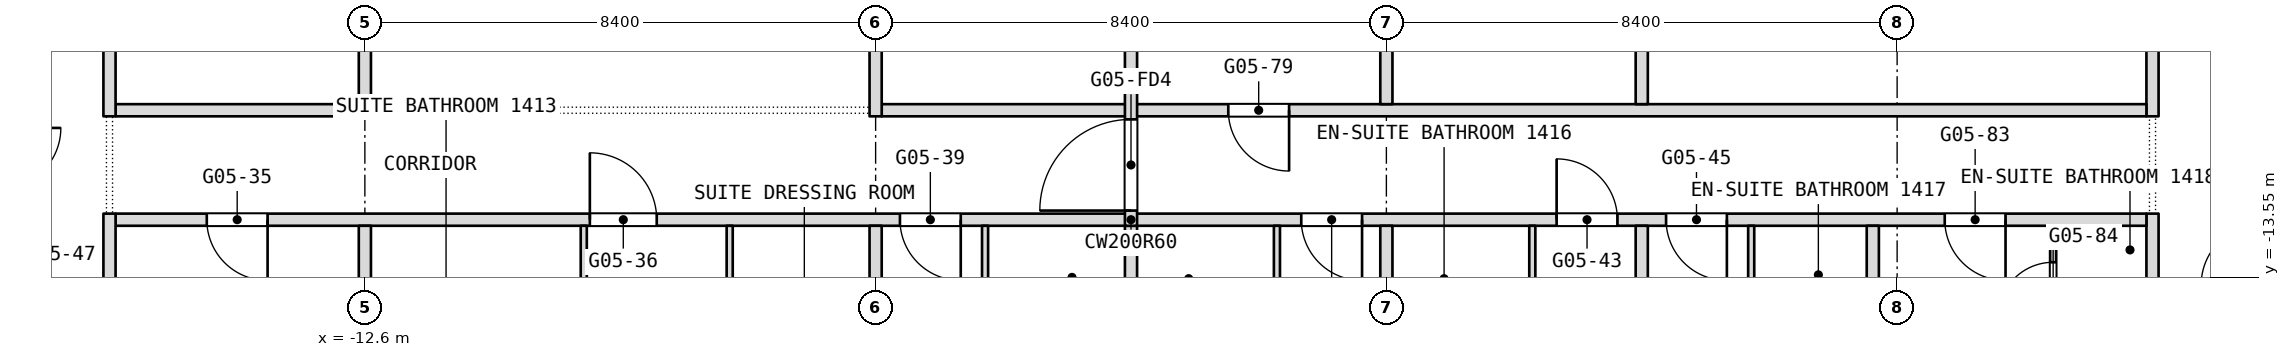
"""IFC4 building model, lengths in metres.
Left out: names, types, materials, properties, quantities, classifications, styles, units other than length and angle.
Written with IfcOpenShell. Run it as: python <this file> out.ifc"""

import sys

from ifc_helpers import new_model, si_unit, direction, frame, frame_2d, origin, place, context, subcontext, project, spatial, rectangle, extrude, element, fill, save


model = new_model("IFC4")
c1 = context("Model", 3, precision=1e-05, world=origin(), true_north=direction((0.0, 1.0)))
c2 = subcontext(c1, "Body", "Model", "MODEL_VIEW")
j1 = project(units=[si_unit("LENGTHUNIT", "METRE"), si_unit("PLANEANGLEUNIT", "RADIAN")], contexts=[c1])
p1 = place(None, origin())
s1 = spatial("IfcSite", under=j1, at=p1, CompositionType="ELEMENT")
p2 = place(p1, origin())
s2 = spatial("IfcBuilding", under=s1, at=p2, CompositionType="ELEMENT")
p3 = place(p2, frame((0.0, 0.0, 65.3)))
s3 = spatial("IfcBuildingStorey", under=s2, at=p3, CompositionType="ELEMENT", Elevation=65.3)
p4 = place(p3, frame((16.8, -17.143, 0.0), z_axis=(0.0, 0.0, 1.0), x_axis=(0.0, 1.0, 0.0)))
e1 = element("IfcWall", 1, at=p4, inside=s3, PredefinedType="PARTITIONING", context=c2, shape_type="SweptSolid", body=[
    extrude(rectangle(XDim=4.643, YDim=0.2, at=frame_2d((2.322, 0.0))), origin(), (0.0, 0.0, 1.0), 3.34),
])
p5 = place(p4, frame((0.772, 0.0, 0.0)))
e2 = element("IfcOpeningElement", 2, at=p5, cuts=e1, PredefinedType="OPENING", context=c2, shape_type="SweptSolid", body=[
    extrude(rectangle(XDim=0.9, YDim=2.1, at=frame_2d((0.45, 1.05))), frame((0.0, 0.1, 0.0), z_axis=(0.0, -1.0, 0.0), x_axis=(1.0, 0.0, 0.0)), (0.0, 0.0, 1.0), 0.2),
])
p6 = place(p3, frame((16.8, -10.9, 0.0), z_axis=(0.0, 0.0, 1.0), x_axis=(0.0, 1.0, 0.0)))
e3 = element("IfcWall", 3, at=p6, inside=s3, PredefinedType="PARTITIONING", context=c2, shape_type="SweptSolid", body=[
    extrude(rectangle(XDim=7.3, YDim=0.2, at=frame_2d((3.65, 0.0))), origin(), (0.0, 0.0, 1.0), 3.34),
])
p7 = place(p6, frame((3.15, 0.0, 0.0)))
e4 = element("IfcOpeningElement", 4, at=p7, cuts=e3, PredefinedType="OPENING", context=c2, shape_type="SweptSolid", body=[
    extrude(rectangle(XDim=1.0, YDim=2.1, at=frame_2d((0.5, 1.05))), frame((0.0, 0.1, 0.0), z_axis=(0.0, -1.0, 0.0), x_axis=(1.0, 0.0, 0.0)), (0.0, 0.0, 1.0), 0.2),
])
p8 = place(p3, frame((15.166, -15.0, 0.0), z_axis=(0.0, 0.0, 1.0), x_axis=(0.0, 1.0, 0.0)))
e5 = element("IfcWall", 5, at=p8, inside=s3, PredefinedType="PARTITIONING", context=c2, shape_type="SweptSolid", body=[
    extrude(rectangle(XDim=2.3, YDim=0.1, at=frame_2d((1.15, 0.0))), origin(), (0.0, 0.0, 1.0), 3.34),
])
p9 = place(p8, frame((0.8, 0.0, 0.0)))
e6 = element("IfcOpeningElement", 6, at=p9, cuts=e5, PredefinedType="OPENING", context=c2, shape_type="SweptSolid", body=[
    extrude(rectangle(XDim=0.9, YDim=2.1, at=frame_2d((0.45, 1.05))), frame((0.0, 0.05, 0.0), z_axis=(0.0, -1.0, 0.0), x_axis=(1.0, 0.0, 0.0)), (0.0, 0.0, 1.0), 0.1),
])
p10 = place(p3, frame((-16.7, -12.6, 0.0), z_axis=(0.0, 0.0, 1.0), x_axis=(1.0, 0.0, 0.0)))
e7 = element("IfcWall", 7, at=p10, inside=s3, PredefinedType="PARTITIONING", context=c2, shape_type="SweptSolid", body=[
    extrude(rectangle(XDim=33.4, YDim=0.2, at=frame_2d((16.7, 0.0))), origin(), (0.0, 0.0, 1.0), 3.34),
])
p11 = place(p10, frame((1.5, 0.0, 0.0)))
e8 = element("IfcOpeningElement", 8, at=p11, cuts=e7, PredefinedType="OPENING", context=c2, shape_type="SweptSolid", body=[
    extrude(rectangle(XDim=1.0, YDim=2.1, at=frame_2d((0.5, 1.05))), frame((0.0, 0.1, 0.0), z_axis=(0.0, -1.0, 0.0), x_axis=(1.0, 0.0, 0.0)), (0.0, 0.0, 1.0), 0.2),
])
p12 = place(p10, frame((7.8, 0.0, 0.0)))
e9 = element("IfcOpeningElement", 9, at=p12, cuts=e7, PredefinedType="OPENING", context=c2, shape_type="SweptSolid", body=[
    extrude(rectangle(XDim=1.1, YDim=2.1, at=frame_2d((0.55, 1.05))), frame((0.0, 0.1, 0.0), z_axis=(0.0, -1.0, 0.0), x_axis=(1.0, 0.0, 0.0)), (0.0, 0.0, 1.0), 0.2),
])
p13 = place(p10, frame((12.9, 0.0, 0.0)))
e10 = element("IfcOpeningElement", 10, at=p13, cuts=e7, PredefinedType="OPENING", context=c2, shape_type="SweptSolid", body=[
    extrude(rectangle(XDim=1.0, YDim=2.1, at=frame_2d((0.5, 1.05))), frame((0.0, 0.1, 0.0), z_axis=(0.0, -1.0, 0.0), x_axis=(1.0, 0.0, 0.0)), (0.0, 0.0, 1.0), 0.2),
])
p14 = place(p10, frame((19.5, 0.0, 0.0)))
e11 = element("IfcOpeningElement", 11, at=p14, cuts=e7, PredefinedType="OPENING", context=c2, shape_type="SweptSolid", body=[
    extrude(rectangle(XDim=1.0, YDim=2.1, at=frame_2d((0.5, 1.05))), frame((0.0, 0.1, 0.0), z_axis=(0.0, -1.0, 0.0), x_axis=(1.0, 0.0, 0.0)), (0.0, 0.0, 1.0), 0.2),
])
p15 = place(p10, frame((23.7, 0.0, 0.0)))
e12 = element("IfcOpeningElement", 12, at=p15, cuts=e7, PredefinedType="OPENING", context=c2, shape_type="SweptSolid", body=[
    extrude(rectangle(XDim=1.0, YDim=2.1, at=frame_2d((0.5, 1.05))), frame((0.0, 0.1, 0.0), z_axis=(0.0, -1.0, 0.0), x_axis=(1.0, 0.0, 0.0)), (0.0, 0.0, 1.0), 0.2),
])
p16 = place(p10, frame((25.5, 0.0, 0.0)))
e13 = element("IfcOpeningElement", 13, at=p16, cuts=e7, PredefinedType="OPENING", context=c2, shape_type="SweptSolid", body=[
    extrude(rectangle(XDim=1.0, YDim=2.1, at=frame_2d((0.5, 1.05))), frame((0.0, 0.1, 0.0), z_axis=(0.0, -1.0, 0.0), x_axis=(1.0, 0.0, 0.0)), (0.0, 0.0, 1.0), 0.2),
])
p17 = place(p10, frame((30.083, 0.0, 0.0)))
e14 = element("IfcOpeningElement", 14, at=p17, cuts=e7, PredefinedType="OPENING", context=c2, shape_type="SweptSolid", body=[
    extrude(rectangle(XDim=1.0, YDim=2.1, at=frame_2d((0.5, 1.05))), frame((0.0, 0.1, 0.0), z_axis=(0.0, -1.0, 0.0), x_axis=(1.0, 0.0, 0.0)), (0.0, 0.0, 1.0), 0.2),
])
p18 = place(p3, frame((12.2, -15.325, 0.0), z_axis=(0.0, 0.0, 1.0), x_axis=(0.0, 1.0, 0.0)))
e15 = element("IfcWall", 15, at=p18, inside=s3, PredefinedType="PARTITIONING", context=c2, shape_type="SweptSolid", body=[
    extrude(rectangle(XDim=2.625, YDim=0.2, at=frame_2d((1.312, 0.0))), origin(), (0.0, 0.0, 1.0), 3.34),
])
p19 = place(p3, frame((-16.7, -10.8, 0.0), z_axis=(0.0, 0.0, 1.0), x_axis=(1.0, 0.0, 0.0)))
e16 = element("IfcWall", 16, at=p19, inside=s3, PredefinedType="PARTITIONING", context=c2, shape_type="SweptSolid", body=[
    extrude(rectangle(XDim=4.0, YDim=0.2, at=frame_2d((2.0, 0.0))), origin(), (0.0, 0.0, 1.0), 3.34),
])
p20 = place(p3, frame((-4.1, -10.8, 0.0), z_axis=(0.0, 0.0, 1.0), x_axis=(1.0, 0.0, 0.0)))
e17 = element("IfcWall", 17, at=p20, inside=s3, PredefinedType="PARTITIONING", context=c2, shape_type="SweptSolid", body=[
    extrude(rectangle(XDim=20.8, YDim=0.2, at=frame_2d((10.4, 0.0))), origin(), (0.0, 0.0, 1.0), 3.34),
])
p21 = place(p20, frame((5.7, 0.0, 0.0)))
e18 = element("IfcOpeningElement", 18, at=p21, cuts=e17, PredefinedType="OPENING", context=c2, shape_type="SweptSolid", body=[
    extrude(rectangle(XDim=1.0, YDim=2.1, at=frame_2d((0.5, 1.05))), frame((0.0, 0.1, 0.0), z_axis=(0.0, -1.0, 0.0), x_axis=(1.0, 0.0, 0.0)), (0.0, 0.0, 1.0), 0.2),
])
p22 = place(p3, frame((10.2, -15.425, 0.0), z_axis=(0.0, 0.0, 1.0), x_axis=(0.0, 1.0, 0.0)))
e19 = element("IfcWall", 19, at=p22, inside=s3, PredefinedType="PARTITIONING", context=c2, shape_type="SweptSolid", body=[
    extrude(rectangle(XDim=2.725, YDim=0.1, at=frame_2d((1.363, 0.0))), origin(), (0.0, 0.0, 1.0), 3.34),
])
p23 = place(p3, frame((8.4, -17.7, 0.0), z_axis=(0.0, 0.0, 1.0), x_axis=(0.0, 1.0, 0.0)))
e20 = element("IfcWall", 20, at=p23, inside=s3, PredefinedType="PARTITIONING", context=c2, shape_type="SweptSolid", body=[
    extrude(rectangle(XDim=5.0, YDim=0.2, at=frame_2d((2.5, 0.0))), origin(), (0.0, 0.0, 1.0), 3.34),
])
p24 = place(p3, frame((8.4, -10.7, 0.0), z_axis=(0.0, 0.0, 1.0), x_axis=(0.0, 1.0, 0.0)))
e21 = element("IfcWall", 21, at=p24, inside=s3, PredefinedType="PARTITIONING", context=c2, shape_type="SweptSolid", body=[
    extrude(rectangle(XDim=3.6, YDim=0.2, at=frame_2d((1.8, 0.0))), origin(), (0.0, 0.0, 1.0), 3.34),
])
p25 = place(p3, frame((6.6, -15.325, 0.0), z_axis=(0.0, 0.0, 1.0), x_axis=(0.0, 1.0, 0.0)))
e22 = element("IfcWall", 22, at=p25, inside=s3, PredefinedType="PARTITIONING", context=c2, shape_type="SweptSolid", body=[
    extrude(rectangle(XDim=2.625, YDim=0.1, at=frame_2d((1.312, 0.0))), origin(), (0.0, 0.0, 1.0), 3.34),
])
p26 = place(p3, frame((4.2, -17.7, 0.0), z_axis=(0.0, 0.0, 1.0), x_axis=(0.0, 1.0, 0.0)))
e23 = element("IfcWall", 23, at=p26, inside=s3, PredefinedType="PARTITIONING", context=c2, shape_type="SweptSolid", body=[
    extrude(rectangle(XDim=5.0, YDim=0.2, at=frame_2d((2.5, 0.0))), origin(), (0.0, 0.0, 1.0), 3.34),
])
p27 = place(p3, frame((4.2, -10.7, 0.0), z_axis=(0.0, 0.0, 1.0), x_axis=(0.0, 1.0, 0.0)))
e24 = element("IfcWall", 24, at=p27, inside=s3, PredefinedType="PARTITIONING", context=c2, shape_type="SweptSolid", body=[
    extrude(rectangle(XDim=8.8, YDim=0.2, at=frame_2d((4.4, 0.0))), origin(), (0.0, 0.0, 1.0), 3.34),
])
p28 = place(p3, frame((2.4, -15.325, 0.0), z_axis=(0.0, 0.0, 1.0), x_axis=(0.0, 1.0, 0.0)))
e25 = element("IfcWall", 25, at=p28, inside=s3, PredefinedType="PARTITIONING", context=c2, shape_type="SweptSolid", body=[
    extrude(rectangle(XDim=2.625, YDim=0.1, at=frame_2d((1.312, 0.0))), origin(), (0.0, 0.0, 1.0), 3.34),
])
p29 = place(p3, frame((0.0, -17.7, 0.0), z_axis=(0.0, 0.0, 1.0), x_axis=(0.0, 1.0, 0.0)))
e26 = element("IfcWall", 26, at=p29, inside=s3, PredefinedType="PARTITIONING", context=c2, shape_type="SweptSolid", body=[
    extrude(rectangle(XDim=5.0, YDim=0.2, at=frame_2d((2.5, 0.0))), origin(), (0.0, 0.0, 1.0), 3.34),
])
p30 = place(p3, frame((0.0, -12.7, 0.0), z_axis=(0.0, 0.0, 1.0), x_axis=(0.0, 1.0, 0.0)))
e27 = element("IfcWall", 27, at=p30, inside=s3, PredefinedType="PARTITIONING", context=c2, shape_type="SweptSolid", body=[
    extrude(rectangle(XDim=12.7, YDim=0.2, at=frame_2d((6.35, 0.0))), origin(), (0.0, 0.0, 1.0), 3.34),
])
p31 = place(p30, frame((11.05, 0.0, 0.0)))
e28 = element("IfcOpeningElement", 28, at=p31, cuts=e27, PredefinedType="OPENING", context=c2, shape_type="SweptSolid", body=[
    extrude(rectangle(XDim=1.5, YDim=2.1, at=frame_2d((0.75, 1.05))), frame((0.0, 0.1, 0.0), z_axis=(0.0, -1.0, 0.0), x_axis=(1.0, 0.0, 0.0)), (0.0, 0.0, 1.0), 0.2),
])
p32 = place(p30, frame((0.25, 0.0, 0.0)))
e29 = element("IfcOpeningElement", 29, at=p32, cuts=e27, PredefinedType="OPENING", context=c2, shape_type="SweptSolid", body=[
    extrude(rectangle(XDim=1.5, YDim=2.1, at=frame_2d((0.75, 1.05))), frame((0.0, 0.1, 0.0), z_axis=(0.0, -1.0, 0.0), x_axis=(1.0, 0.0, 0.0)), (0.0, 0.0, 1.0), 0.2),
])
p33 = place(p3, frame((-2.4, -15.425, 0.0), z_axis=(0.0, 0.0, 1.0), x_axis=(0.0, 1.0, 0.0)))
e30 = element("IfcWall", 30, at=p33, inside=s3, PredefinedType="PARTITIONING", context=c2, shape_type="SweptSolid", body=[
    extrude(rectangle(XDim=2.725, YDim=0.1, at=frame_2d((1.363, 0.0))), origin(), (0.0, 0.0, 1.0), 3.34),
])
p34 = place(p3, frame((-4.2, -17.7, 0.0), z_axis=(0.0, 0.0, 1.0), x_axis=(0.0, 1.0, 0.0)))
e31 = element("IfcWall", 31, at=p34, inside=s3, PredefinedType="PARTITIONING", context=c2, shape_type="SweptSolid", body=[
    extrude(rectangle(XDim=5.0, YDim=0.2, at=frame_2d((2.5, 0.0))), origin(), (0.0, 0.0, 1.0), 3.34),
])
p35 = place(p3, frame((-4.2, -10.9, 0.0), z_axis=(0.0, 0.0, 1.0), x_axis=(0.0, 1.0, 0.0)))
e32 = element("IfcWall", 32, at=p35, inside=s3, PredefinedType="PARTITIONING", context=c2, shape_type="SweptSolid", body=[
    extrude(rectangle(XDim=9.0, YDim=0.2, at=frame_2d((4.5, 0.0))), origin(), (0.0, 0.0, 1.0), 3.34),
])
p36 = place(p35, frame((4.0, 0.0, 0.0)))
e33 = element("IfcOpeningElement", 33, at=p36, cuts=e32, PredefinedType="OPENING", context=c2, shape_type="SweptSolid", body=[
    extrude(rectangle(XDim=1.0, YDim=2.1, at=frame_2d((0.5, 1.05))), frame((0.0, 0.1, 0.0), z_axis=(0.0, -1.0, 0.0), x_axis=(1.0, 0.0, 0.0)), (0.0, 0.0, 1.0), 0.2),
])
p37 = place(p3, frame((-6.6, -16.25, 0.0), z_axis=(0.0, 0.0, 1.0), x_axis=(0.0, 1.0, 0.0)))
e34 = element("IfcWall", 34, at=p37, inside=s3, PredefinedType="PARTITIONING", context=c2, shape_type="SweptSolid", body=[
    extrude(rectangle(XDim=3.55, YDim=0.1, at=frame_2d((1.775, 0.0))), origin(), (0.0, 0.0, 1.0), 3.34),
])
p38 = place(p3, frame((-9.0, -16.15, 0.0), z_axis=(0.0, 0.0, 1.0), x_axis=(0.0, 1.0, 0.0)))
e35 = element("IfcWall", 35, at=p38, inside=s3, PredefinedType="PARTITIONING", context=c2, shape_type="SweptSolid", body=[
    extrude(rectangle(XDim=3.45, YDim=0.1, at=frame_2d((1.725, 0.0))), origin(), (0.0, 0.0, 1.0), 3.34),
])
p39 = place(p38, frame((0.94, 0.0, 0.0)))
e36 = element("IfcOpeningElement", 36, at=p39, cuts=e35, PredefinedType="OPENING", context=c2, shape_type="SweptSolid", body=[
    extrude(rectangle(XDim=0.9, YDim=2.1, at=frame_2d((0.45, 1.05))), frame((0.0, 0.05, 0.0), z_axis=(0.0, -1.0, 0.0), x_axis=(1.0, 0.0, 0.0)), (0.0, 0.0, 1.0), 0.1),
])
p40 = place(p3, frame((-12.6, -17.7, 0.0), z_axis=(0.0, 0.0, 1.0), x_axis=(0.0, 1.0, 0.0)))
e37 = element("IfcWall", 37, at=p40, inside=s3, PredefinedType="PARTITIONING", context=c2, shape_type="SweptSolid", body=[
    extrude(rectangle(XDim=5.0, YDim=0.2, at=frame_2d((2.5, 0.0))), origin(), (0.0, 0.0, 1.0), 3.34),
])
p41 = place(p3, frame((-12.6, -10.9, 0.0), z_axis=(0.0, 0.0, 1.0), x_axis=(0.0, 1.0, 0.0)))
e38 = element("IfcWall", 38, at=p41, inside=s3, PredefinedType="PARTITIONING", context=c2, shape_type="SweptSolid", body=[
    extrude(rectangle(XDim=5.6, YDim=0.2, at=frame_2d((2.8, 0.0))), origin(), (0.0, 0.0, 1.0), 3.34),
])
p42 = place(p3, frame((-16.8, -17.143, 0.0), z_axis=(0.0, 0.0, 1.0), x_axis=(0.0, 1.0, 0.0)))
e39 = element("IfcWall", 39, at=p42, inside=s3, PredefinedType="PARTITIONING", context=c2, shape_type="SweptSolid", body=[
    extrude(rectangle(XDim=4.643, YDim=0.2, at=frame_2d((2.322, 0.0))), origin(), (0.0, 0.0, 1.0), 3.34),
])
p43 = place(p3, frame((-16.8, -10.9, 0.0), z_axis=(0.0, 0.0, 1.0), x_axis=(0.0, 1.0, 0.0)))
e40 = element("IfcWall", 40, at=p43, inside=s3, PredefinedType="PARTITIONING", context=c2, shape_type="SweptSolid", body=[
    extrude(rectangle(XDim=9.0, YDim=0.2, at=frame_2d((4.5, 0.0))), origin(), (0.0, 0.0, 1.0), 3.34),
])
p44 = place(p9, origin())
e41 = element("IfcDoor", 41, at=p44, inside=s3, OperationType="SINGLE_SWING_RIGHT", PredefinedType="DOOR", context=c2, shape_type="SweptSolid", body=[
    extrude(rectangle(XDim=0.9, YDim=2.1, at=frame_2d((0.45, 1.05))), frame((0.0, 0.025, 0.0), z_axis=(0.0, -1.0, 0.0), x_axis=(1.0, 0.0, 0.0)), (0.0, 0.0, 1.0), 0.05),
])
fill(e6, e41)
p45 = place(p11, origin())
e42 = element("IfcDoor", 42, at=p45, inside=s3, OperationType="SINGLE_SWING_RIGHT", PredefinedType="DOOR", context=c2, shape_type="SweptSolid", body=[
    extrude(rectangle(XDim=1.0, YDim=2.1, at=frame_2d((0.5, 1.05))), frame((0.0, 0.025, 0.0), z_axis=(0.0, -1.0, 0.0), x_axis=(1.0, 0.0, 0.0)), (0.0, 0.0, 1.0), 0.05),
])
fill(e8, e42)
p46 = place(p12, origin())
e43 = element("IfcDoor", 43, at=p46, inside=s3, OperationType="SINGLE_SWING_RIGHT", PredefinedType="DOOR", context=c2, shape_type="SweptSolid", body=[
    extrude(rectangle(XDim=1.1, YDim=2.1, at=frame_2d((0.55, 1.05))), frame((0.0, 0.025, 0.0), z_axis=(0.0, -1.0, 0.0), x_axis=(1.0, 0.0, 0.0)), (0.0, 0.0, 1.0), 0.05),
])
fill(e9, e43)
p47 = place(p13, origin())
e44 = element("IfcDoor", 44, at=p47, inside=s3, OperationType="SINGLE_SWING_LEFT", PredefinedType="DOOR", context=c2, shape_type="SweptSolid", body=[
    extrude(rectangle(XDim=1.0, YDim=2.1, at=frame_2d((0.5, 1.05))), frame((0.0, 0.025, 0.0), z_axis=(0.0, -1.0, 0.0), x_axis=(1.0, 0.0, 0.0)), (0.0, 0.0, 1.0), 0.05),
])
fill(e10, e44)
p48 = place(p14, origin())
e45 = element("IfcDoor", 45, at=p48, inside=s3, OperationType="SINGLE_SWING_LEFT", PredefinedType="DOOR", context=c2, shape_type="SweptSolid", body=[
    extrude(rectangle(XDim=1.0, YDim=2.1, at=frame_2d((0.5, 1.05))), frame((0.0, 0.025, 0.0), z_axis=(0.0, -1.0, 0.0), x_axis=(1.0, 0.0, 0.0)), (0.0, 0.0, 1.0), 0.05),
])
fill(e11, e45)
p49 = place(p15, origin())
e46 = element("IfcDoor", 46, at=p49, inside=s3, OperationType="SINGLE_SWING_LEFT", PredefinedType="DOOR", context=c2, shape_type="SweptSolid", body=[
    extrude(rectangle(XDim=1.0, YDim=2.1, at=frame_2d((0.5, 1.05))), frame((0.0, 0.025, 0.0), z_axis=(0.0, -1.0, 0.0), x_axis=(1.0, 0.0, 0.0)), (0.0, 0.0, 1.0), 0.05),
])
fill(e12, e46)
p50 = place(p16, origin())
e47 = element("IfcDoor", 47, at=p50, inside=s3, OperationType="SINGLE_SWING_LEFT", PredefinedType="DOOR", context=c2, shape_type="SweptSolid", body=[
    extrude(rectangle(XDim=1.0, YDim=2.1, at=frame_2d((0.5, 1.05))), frame((0.0, 0.025, 0.0), z_axis=(0.0, -1.0, 0.0), x_axis=(1.0, 0.0, 0.0)), (0.0, 0.0, 1.0), 0.05),
])
fill(e13, e47)
p51 = place(p17, origin())
e48 = element("IfcDoor", 48, at=p51, inside=s3, OperationType="SINGLE_SWING_LEFT", PredefinedType="DOOR", context=c2, shape_type="SweptSolid", body=[
    extrude(rectangle(XDim=1.0, YDim=2.1, at=frame_2d((0.5, 1.05))), frame((0.0, 0.025, 0.0), z_axis=(0.0, -1.0, 0.0), x_axis=(1.0, 0.0, 0.0)), (0.0, 0.0, 1.0), 0.05),
])
fill(e14, e48)
p52 = place(p21, origin())
e49 = element("IfcDoor", 49, at=p52, inside=s3, OperationType="SINGLE_SWING_LEFT", PredefinedType="DOOR", context=c2, shape_type="SweptSolid", body=[
    extrude(rectangle(XDim=1.0, YDim=2.1, at=frame_2d((0.5, 1.05))), frame((0.0, 0.025, 0.0), z_axis=(0.0, -1.0, 0.0), x_axis=(1.0, 0.0, 0.0)), (0.0, 0.0, 1.0), 0.05),
])
fill(e18, e49)
p53 = place(p32, origin())
e50 = element("IfcDoor", 50, at=p53, inside=s3, OperationType="DOUBLE_DOOR_DOUBLE_SWING", PredefinedType="DOOR", context=c2, shape_type="SweptSolid", body=[
    extrude(rectangle(XDim=1.5, YDim=2.1, at=frame_2d((0.75, 1.05))), frame((0.0, 0.025, 0.0), z_axis=(0.0, -1.0, 0.0), x_axis=(1.0, 0.0, 0.0)), (0.0, 0.0, 1.0), 0.05),
])
fill(e29, e50)
save(model, sys.argv[1])
